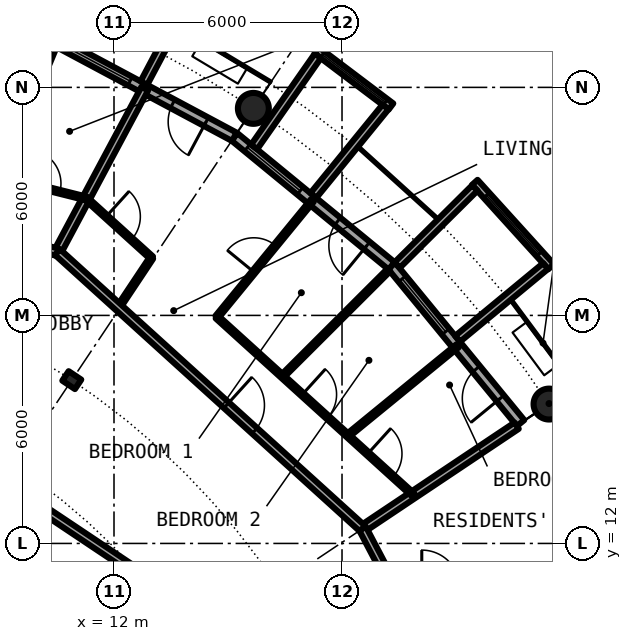
"""IFC4 building model, lengths in metres.
Left out: names, types, materials, properties, quantities, classifications, styles, units other than length and angle.
Written with IfcOpenShell. Run it as: python <this file> out.ifc"""

import sys

from ifc_helpers import new_model, si_unit, direction, frame, frame_2d, origin, origin_2d, place, context, subcontext, project, spatial, rectangle, circle, hollow_circle, i_section, extrude, element, fill, save


model = new_model("IFC4")
c1 = context("Model", 3, precision=1e-05, world=origin(), true_north=direction((0.0, 1.0)))
c2 = subcontext(c1, "Body", "Model", "MODEL_VIEW")
j1 = project(units=[si_unit("LENGTHUNIT", "METRE"), si_unit("PLANEANGLEUNIT", "RADIAN")], contexts=[c1])
p1 = place(None, origin())
s1 = spatial("IfcSite", under=j1, at=p1, CompositionType="ELEMENT")
p2 = place(p1, origin())
s2 = spatial("IfcBuilding", under=s1, at=p2, CompositionType="ELEMENT")
p3 = place(p2, frame((0.0, 0.0, 196.3)))
s3 = spatial("IfcBuildingStorey", under=s2, at=p3, CompositionType="ELEMENT", Elevation=196.3)
for number, where, z_axis, x_axis in (
    (1, (23.448, 15.667, 0.0), (0.0, 0.0, 1.0), (1.0, 0.0, 0.0)),
    (2, (15.667, 23.448, 0.0), (0.0, 0.0, 1.0), (1.0, 0.0, 0.0)),
):
    element("IfcColumn", number, at=place(p3, frame(where, z_axis=z_axis, x_axis=x_axis)), inside=s3, PredefinedType="COLUMN", context=c2, shape_type="SweptSolid", body=[
        extrude(hollow_circle(Radius=0.406, WallThickness=0.03, at=origin_2d()), origin(), (0.0, 0.0, 1.0), 3.05),
    ])
p4 = place(p3, frame((10.889, 16.297, 0.0), z_axis=(0.0, 0.0, 1.0), x_axis=(0.55557023302, 0.831469612303, 0.0)))
e3 = element("IfcColumn", 3, at=p4, inside=s3, PredefinedType="COLUMN", context=c2, shape_type="SweptSolid", body=[
    extrude(i_section(OverallWidth=0.3, OverallDepth=0.4, WebThickness=0.013, FlangeThickness=0.024, FilletRadius=0.027, at=origin_2d()), origin(), (0.0, 0.0, 1.0), 3.05),
])
p5 = place(p3, frame((22.699, 15.167, 0.0), z_axis=(0.0, 0.0, 1.0), x_axis=(-0.634382322723, 0.773019449054, 0.0)))
e4 = element("IfcWall", 4, at=p5, inside=s3, PredefinedType="SOLIDWALL", context=c2, shape_type="SweptSolid", body=[
    extrude(rectangle(XDim=5.352, YDim=0.25, at=frame_2d((2.676, 0.0))), origin(), (0.0, 0.0, 1.0), 2.7),
])
p6 = place(p5, frame((0.841, 0.0, 0.0)))
e5 = element("IfcOpeningElement", 5, at=p6, cuts=e4, PredefinedType="OPENING", context=c2, shape_type="SweptSolid", body=[
    extrude(rectangle(XDim=1.0, YDim=2.2, at=frame_2d((0.5, 1.1))), frame((0.0, 0.135, 0.0), z_axis=(0.0, -1.0, 0.0), x_axis=(1.0, 0.0, 0.0)), (0.0, 0.0, 1.0), 0.27),
])
p7 = place(p5, frame((3.111, 0.0, 0.3)))
e6 = element("IfcOpeningElement", 6, at=p7, cuts=e4, PredefinedType="OPENING", context=c2, shape_type="SweptSolid", body=[
    extrude(rectangle(XDim=1.8, YDim=2.1, at=frame_2d((0.9, 1.05))), frame((0.0, 0.135, 0.0), z_axis=(0.0, -1.0, 0.0), x_axis=(1.0, 0.0, 0.0)), (0.0, 0.0, 1.0), 0.27),
])
p8 = place(p3, frame((23.503, 19.282, -0.03), z_axis=(0.0, 0.0, 1.0), x_axis=(-0.671506829416, 0.740998365753, 0.0)))
e7 = element("IfcWall", 7, at=p8, inside=s3, PredefinedType="SOLIDWALL", context=c2, shape_type="SweptSolid", body=[
    extrude(rectangle(XDim=2.993, YDim=0.2, at=frame_2d((1.497, 0.0))), origin(), (0.0, 0.0, 1.0), 2.73),
])
p9 = place(p8, frame((0.457, 0.0, 0.33)))
e8 = element("IfcOpeningElement", 8, at=p9, cuts=e7, PredefinedType="OPENING", context=c2, shape_type="SweptSolid", body=[
    extrude(circle(Radius=1.04, at=frame_2d((1.04, 1.04))), frame((0.0, 0.11, 0.0), z_axis=(0.0, -1.0, 0.0), x_axis=(1.0, 0.0, 0.0)), (0.0, 0.0, 1.0), 0.22),
])
p10 = place(p3, frame((21.041, 17.384, -0.03), z_axis=(0.0, 0.0, 1.0), x_axis=(0.770784861449, 0.63709551667, 0.0)))
e9 = element("IfcWall", 9, at=p10, inside=s3, PredefinedType="SOLIDWALL", context=c2, shape_type="SweptSolid", body=[
    extrude(rectangle(XDim=3.006, YDim=0.2, at=frame_2d((1.503, 0.0))), origin(), (0.0, 0.0, 1.0), 2.73),
])
p11 = place(p3, frame((19.45, 19.323, -0.03), z_axis=(0.0, 0.0, 1.0), x_axis=(0.709727076896, 0.704476739375, 0.0)))
e10 = element("IfcWall", 10, at=p11, inside=s3, PredefinedType="SOLIDWALL", context=c2, shape_type="SweptSolid", body=[
    extrude(rectangle(XDim=2.883, YDim=0.2, at=frame_2d((1.441, 0.0))), origin(), (0.0, 0.0, 1.0), 2.73),
])
p12 = place(p3, frame((19.304, 19.304, 0.0), z_axis=(0.0, 0.0, 1.0), x_axis=(-0.773019449054, 0.634382322723, 0.0)))
e11 = element("IfcWall", 11, at=p12, inside=s3, PredefinedType="SOLIDWALL", context=c2, shape_type="SweptSolid", body=[
    extrude(rectangle(XDim=5.352, YDim=0.25, at=frame_2d((2.676, 0.0))), origin(), (0.0, 0.0, 1.0), 2.7),
])
p13 = place(p12, frame((0.841, 0.0, 0.0)))
e12 = element("IfcOpeningElement", 12, at=p13, cuts=e11, PredefinedType="OPENING", context=c2, shape_type="SweptSolid", body=[
    extrude(rectangle(XDim=1.0, YDim=2.2, at=frame_2d((0.5, 1.1))), frame((0.0, 0.135, 0.0), z_axis=(0.0, -1.0, 0.0), x_axis=(1.0, 0.0, 0.0)), (0.0, 0.0, 1.0), 0.27),
])
p14 = place(p12, frame((3.111, 0.0, 0.3)))
e13 = element("IfcOpeningElement", 13, at=p14, cuts=e11, PredefinedType="OPENING", context=c2, shape_type="SweptSolid", body=[
    extrude(rectangle(XDim=1.8, YDim=2.1, at=frame_2d((0.9, 1.05))), frame((0.0, 0.135, 0.0), z_axis=(0.0, -1.0, 0.0), x_axis=(1.0, 0.0, 0.0)), (0.0, 0.0, 1.0), 0.27),
])
p15 = place(p3, frame((19.289, 23.497, -0.03), z_axis=(0.0, 0.0, 1.0), x_axis=(-0.797887588059, 0.602806268067, 0.0)))
e14 = element("IfcWall", 14, at=p15, inside=s3, PredefinedType="SOLIDWALL", context=c2, shape_type="SweptSolid", body=[
    extrude(rectangle(XDim=2.447, YDim=0.2, at=frame_2d((1.223, 0.0))), origin(), (0.0, 0.0, 1.0), 2.73),
])
p16 = place(p15, frame((0.183, 0.0, 0.33)))
e15 = element("IfcOpeningElement", 15, at=p16, cuts=e14, PredefinedType="OPENING", context=c2, shape_type="SweptSolid", body=[
    extrude(circle(Radius=1.04, at=frame_2d((1.04, 1.04))), frame((0.0, 0.11, 0.0), z_axis=(0.0, -1.0, 0.0), x_axis=(1.0, 0.0, 0.0)), (0.0, 0.0, 1.0), 0.22),
])
p17 = place(p3, frame((17.246, 21.155, -0.03), z_axis=(0.0, 0.0, 1.0), x_axis=(0.631741648902, 0.775179004516, 0.0)))
e16 = element("IfcWall", 16, at=p17, inside=s3, PredefinedType="SOLIDWALL", context=c2, shape_type="SweptSolid", body=[
    extrude(rectangle(XDim=3.006, YDim=0.2, at=frame_2d((1.503, 0.0))), origin(), (0.0, 0.0, 1.0), 2.73),
])
p18 = place(p3, frame((15.688, 22.433, -0.03), z_axis=(0.0, 0.0, 1.0), x_axis=(0.573260687834, 0.819373043115, 0.0)))
e17 = element("IfcWall", 17, at=p18, inside=s3, PredefinedType="SOLIDWALL", context=c2, shape_type="SweptSolid", body=[
    extrude(rectangle(XDim=2.925, YDim=0.2, at=frame_2d((1.463, 0.0))), origin(), (0.0, 0.0, 1.0), 2.73),
])
p19 = place(p3, frame((15.167, 22.699, 0.0), z_axis=(0.0, 0.0, 1.0), x_axis=(-0.881915646801, 0.471407246368, 0.0)))
e18 = element("IfcWall", 18, at=p19, inside=s3, PredefinedType="SOLIDWALL", context=c2, shape_type="SweptSolid", body=[
    extrude(rectangle(XDim=5.352, YDim=0.25, at=frame_2d((2.676, 0.0))), origin(), (0.0, 0.0, 1.0), 2.7),
])
p20 = place(p19, frame((0.841, 0.0, 0.0)))
e19 = element("IfcOpeningElement", 19, at=p20, cuts=e18, PredefinedType="OPENING", context=c2, shape_type="SweptSolid", body=[
    extrude(rectangle(XDim=1.0, YDim=2.2, at=frame_2d((0.5, 1.1))), frame((0.0, 0.135, 0.0), z_axis=(0.0, -1.0, 0.0), x_axis=(1.0, 0.0, 0.0)), (0.0, 0.0, 1.0), 0.27),
])
p21 = place(p19, frame((3.111, 0.0, 0.3)))
e20 = element("IfcOpeningElement", 20, at=p21, cuts=e18, PredefinedType="OPENING", context=c2, shape_type="SweptSolid", body=[
    extrude(rectangle(XDim=1.8, YDim=2.1, at=frame_2d((0.9, 1.05))), frame((0.0, 0.135, 0.0), z_axis=(0.0, -1.0, 0.0), x_axis=(1.0, 0.0, 0.0)), (0.0, 0.0, 1.0), 0.27),
])
p22 = place(p3, frame((12.787, 24.113, -0.03), z_axis=(0.0, 0.0, 1.0), x_axis=(0.468365282436, 0.883534924159, 0.0)))
e21 = element("IfcWall", 21, at=p22, inside=s3, PredefinedType="SOLIDWALL", context=c2, shape_type="SweptSolid", body=[
    extrude(rectangle(XDim=3.006, YDim=0.2, at=frame_2d((1.503, 0.0))), origin(), (0.0, 0.0, 1.0), 2.73),
])
p23 = place(p3, frame((9.013, 21.642, 0.0), z_axis=(0.0, 0.0, 1.0), x_axis=(0.384420204655, 0.923158223845, 0.0)))
e22 = element("IfcWall", 22, at=p23, inside=s3, PredefinedType="PARTITIONING", context=c2, shape_type="SweptSolid", body=[
    extrude(rectangle(XDim=3.73, YDim=0.1, at=frame_2d((1.865, 0.0))), origin(), (0.0, 0.0, 1.0), 2.7),
])
p24 = place(p3, frame((10.512, 19.667, 0.0), z_axis=(0.0, 0.0, 1.0), x_axis=(0.471271812246, 0.881988026553, 0.0)))
e23 = element("IfcWall", 23, at=p24, inside=s3, PredefinedType="PARTITIONING", context=c2, shape_type="SweptSolid", body=[
    extrude(rectangle(XDim=4.874, YDim=0.2, at=frame_2d((2.437, 0.0))), origin(), (0.0, 0.0, 1.0), 2.7),
])
p25 = place(p3, frame((12.118, 18.211, 0.0), z_axis=(0.0, 0.0, 1.0), x_axis=(0.554125989098, 0.832432813028, 0.0)))
e24 = element("IfcWall", 24, at=p25, inside=s3, PredefinedType="PARTITIONING", context=c2, shape_type="SweptSolid", body=[
    extrude(rectangle(XDim=1.57, YDim=0.1, at=frame_2d((0.785, 0.0))), origin(), (0.0, 0.0, 1.0), 2.7),
])
p26 = place(p3, frame((14.709, 17.958, 0.0), z_axis=(0.0, 0.0, 1.0), x_axis=(0.633590098448, 0.773668913133, 0.0)))
e25 = element("IfcWall", 25, at=p26, inside=s3, PredefinedType="PARTITIONING", context=c2, shape_type="SweptSolid", body=[
    extrude(rectangle(XDim=3.962, YDim=0.1, at=frame_2d((1.981, 0.0))), origin(), (0.0, 0.0, 1.0), 2.7),
])
p27 = place(p26, frame((1.531, 0.0, 0.0)))
e26 = element("IfcOpeningElement", 26, at=p27, cuts=e25, PredefinedType="OPENING", context=c2, shape_type="SweptSolid", body=[
    extrude(rectangle(XDim=0.9, YDim=2.3, at=frame_2d((0.45, 1.15))), frame((0.0, 0.06, 0.0), z_axis=(0.0, -1.0, 0.0), x_axis=(1.0, 0.0, 0.0)), (0.0, 0.0, 1.0), 0.12),
])
p28 = place(p3, frame((16.43, 16.398, 0.0), z_axis=(0.0, 0.0, 1.0), x_axis=(0.707722727509, 0.706490297858, 0.0)))
e27 = element("IfcWall", 27, at=p28, inside=s3, PredefinedType="PARTITIONING", context=c2, shape_type="SweptSolid", body=[
    extrude(rectangle(XDim=3.962, YDim=0.1, at=frame_2d((1.981, 0.0))), origin(), (0.0, 0.0, 1.0), 2.7),
])
p29 = place(p3, frame((18.151, 14.838, 0.0), z_axis=(0.0, 0.0, 1.0), x_axis=(0.774321581607, 0.63279229472, 0.0)))
e28 = element("IfcWall", 28, at=p29, inside=s3, PredefinedType="PARTITIONING", context=c2, shape_type="SweptSolid", body=[
    extrude(rectangle(XDim=3.731, YDim=0.1, at=frame_2d((1.866, 0.0))), origin(), (0.0, 0.0, 1.0), 2.7),
])
p30 = place(p3, frame((18.542, 12.389, 0.0), z_axis=(0.0, 0.0, 1.0), x_axis=(0.831387096605, 0.55569370664, 0.0)))
e29 = element("IfcWall", 29, at=p30, inside=s3, PredefinedType="PARTITIONING", context=c2, shape_type="SweptSolid", body=[
    extrude(rectangle(XDim=4.875, YDim=0.2, at=frame_2d((2.438, 0.0))), origin(), (0.0, 0.0, 1.0), 2.7),
])
p31 = place(p3, frame((3.453, 17.36, 0.0), z_axis=(0.0, 0.0, 1.0), x_axis=(0.831437137577, -0.555618831806, 0.0)))
e30 = element("IfcWall", 30, at=p31, inside=s3, PredefinedType="PARTITIONING", context=c2, shape_type="SweptSolid", body=[
    extrude(rectangle(XDim=13.549, YDim=0.2, at=frame_2d((6.774, 0.0))), origin(), (0.0, 0.0, 1.0), 2.7),
])
p32 = place(p31, frame((4.581, 0.0, 0.0)))
e31 = element("IfcOpeningElement", 31, at=p32, cuts=e30, PredefinedType="OPENING", context=c2, shape_type="SweptSolid", body=[
    extrude(rectangle(XDim=1.0, YDim=2.3, at=frame_2d((0.5, 1.15))), frame((0.0, 0.11, 0.0), z_axis=(0.0, -1.0, 0.0), x_axis=(1.0, 0.0, 0.0)), (0.0, 0.0, 1.0), 0.22),
])
p33 = place(p3, frame((0.0, 22.3, 0.0), z_axis=(0.0, 0.0, 1.0), x_axis=(0.969975381822, -0.243203122222, 0.0)))
e32 = element("IfcWall", 32, at=p33, inside=s3, PredefinedType="PARTITIONING", context=c2, shape_type="SweptSolid", body=[
    extrude(rectangle(XDim=10.843, YDim=0.2, at=frame_2d((5.421, 0.0))), origin(), (0.0, 0.0, 1.0), 2.7),
])
p34 = place(p33, frame((6.002, 0.0, 0.0)))
e33 = element("IfcOpeningElement", 33, at=p34, cuts=e32, PredefinedType="OPENING", context=c2, shape_type="SweptSolid", body=[
    extrude(rectangle(XDim=1.0, YDim=2.3, at=frame_2d((0.5, 1.15))), frame((0.0, 0.11, 0.0), z_axis=(0.0, -1.0, 0.0), x_axis=(1.0, 0.0, 0.0)), (0.0, 0.0, 1.0), 0.22),
])
p35 = place(p3, frame((10.512, 19.667, 0.0), z_axis=(0.0, 0.0, 1.0), x_axis=(0.740849323054, -0.67167125927, 0.0)))
e34 = element("IfcWall", 34, at=p35, inside=s3, PredefinedType="PARTITIONING", context=c2, shape_type="SweptSolid", body=[
    extrude(rectangle(XDim=10.842, YDim=0.2, at=frame_2d((5.421, 0.0))), origin(), (0.0, 0.0, 1.0), 2.7),
])
p36 = place(p35, frame((6.003, 0.0, 0.0)))
e35 = element("IfcOpeningElement", 35, at=p36, cuts=e34, PredefinedType="OPENING", context=c2, shape_type="SweptSolid", body=[
    extrude(rectangle(XDim=1.0, YDim=2.3, at=frame_2d((0.5, 1.15))), frame((0.0, 0.11, 0.0), z_axis=(0.0, -1.0, 0.0), x_axis=(1.0, 0.0, 0.0)), (0.0, 0.0, 1.0), 0.22),
])
p37 = place(p3, frame((18.542, 12.389, 0.0), z_axis=(0.0, 0.0, 1.0), x_axis=(0.465359652486, -0.885121683068, 0.0)))
e36 = element("IfcWall", 36, at=p37, inside=s3, PredefinedType="PARTITIONING", context=c2, shape_type="SweptSolid", body=[
    extrude(rectangle(XDim=1.665, YDim=0.2, at=frame_2d((0.833, 0.0))), origin(), (0.0, 0.0, 1.0), 2.7),
])
p38 = place(p3, frame((4.507, 22.771, 0.0), z_axis=(0.0, 0.0, 1.0), x_axis=(0.970020829306, -0.243021790611, 0.0)))
e37 = element("IfcWall", 37, at=p38, inside=s3, PredefinedType="PARTITIONING", context=c2, shape_type="SweptSolid", body=[
    extrude(rectangle(XDim=6.971, YDim=0.1, at=frame_2d((3.485, 0.0))), origin(), (0.0, 0.0, 1.0), 2.7),
])
p39 = place(p38, frame((3.031, 0.0, 0.0)))
e38 = element("IfcOpeningElement", 38, at=p39, cuts=e37, PredefinedType="OPENING", context=c2, shape_type="SweptSolid", body=[
    extrude(rectangle(XDim=0.9, YDim=2.3, at=frame_2d((0.45, 1.15))), frame((0.0, 0.06, 0.0), z_axis=(0.0, -1.0, 0.0), x_axis=(1.0, 0.0, 0.0)), (0.0, 0.0, 1.0), 0.12),
])
p40 = place(p38, frame((5.358, 0.0, 0.0)))
e39 = element("IfcOpeningElement", 39, at=p40, cuts=e37, PredefinedType="OPENING", context=c2, shape_type="SweptSolid", body=[
    extrude(rectangle(XDim=0.9, YDim=2.3, at=frame_2d((0.45, 1.15))), frame((0.0, 0.06, 0.0), z_axis=(0.0, -1.0, 0.0), x_axis=(1.0, 0.0, 0.0)), (0.0, 0.0, 1.0), 0.12),
])
p41 = place(p3, frame((11.271, 21.074, 0.0), z_axis=(0.0, 0.0, 1.0), x_axis=(0.74087097024, -0.671647381783, 0.0)))
e40 = element("IfcWall", 40, at=p41, inside=s3, PredefinedType="PARTITIONING", context=c2, shape_type="SweptSolid", body=[
    extrude(rectangle(XDim=2.324, YDim=0.1, at=frame_2d((1.162, 0.0))), origin(), (0.0, 0.0, 1.0), 2.7),
])
p42 = place(p41, frame((0.705, 0.0, 0.0)))
e41 = element("IfcOpeningElement", 41, at=p42, cuts=e40, PredefinedType="OPENING", context=c2, shape_type="SweptSolid", body=[
    extrude(rectangle(XDim=0.9, YDim=2.3, at=frame_2d((0.45, 1.15))), frame((0.0, 0.06, 0.0), z_axis=(0.0, -1.0, 0.0), x_axis=(1.0, 0.0, 0.0)), (0.0, 0.0, 1.0), 0.12),
])
p43 = place(p3, frame((14.709, 17.958, 0.0), z_axis=(0.0, 0.0, 1.0), x_axis=(0.740923753351, -0.671589153962, 0.0)))
e42 = element("IfcWall", 42, at=p43, inside=s3, PredefinedType="PARTITIONING", context=c2, shape_type="SweptSolid", body=[
    extrude(rectangle(XDim=6.969, YDim=0.1, at=frame_2d((3.484, 0.0))), origin(), (0.0, 0.0, 1.0), 2.7),
])
p44 = place(p43, frame((3.034, 0.0, 0.0)))
e43 = element("IfcOpeningElement", 43, at=p44, cuts=e42, PredefinedType="OPENING", context=c2, shape_type="SweptSolid", body=[
    extrude(rectangle(XDim=0.9, YDim=2.3, at=frame_2d((0.45, 1.15))), frame((0.0, 0.06, 0.0), z_axis=(0.0, -1.0, 0.0), x_axis=(1.0, 0.0, 0.0)), (0.0, 0.0, 1.0), 0.12),
])
p45 = place(p43, frame((5.357, 0.0, 0.0)))
e44 = element("IfcOpeningElement", 44, at=p45, cuts=e42, PredefinedType="OPENING", context=c2, shape_type="SweptSolid", body=[
    extrude(rectangle(XDim=0.9, YDim=2.3, at=frame_2d((0.45, 1.15))), frame((0.0, 0.06, 0.0), z_axis=(0.0, -1.0, 0.0), x_axis=(1.0, 0.0, 0.0)), (0.0, 0.0, 1.0), 0.12),
])
p46 = place(p6, origin())
e45 = element("IfcDoor", 45, at=p46, inside=s3, OperationType="SINGLE_SWING_LEFT", PredefinedType="DOOR", context=c2, shape_type="SweptSolid", body=[
    extrude(rectangle(XDim=1.0, YDim=2.2, at=frame_2d((0.5, 1.1))), frame((0.0, 0.025, 0.0), z_axis=(0.0, -1.0, 0.0), x_axis=(1.0, 0.0, 0.0)), (0.0, 0.0, 1.0), 0.05),
])
fill(e5, e45)
p47 = place(p7, origin())
e46 = element("IfcWindow", 46, at=p47, inside=s3, PartitioningType="SINGLE_PANEL", PredefinedType="WINDOW", context=c2, shape_type="SweptSolid", body=[
    extrude(rectangle(XDim=1.8, YDim=2.1, at=frame_2d((0.9, 1.05))), frame((0.0, 0.03, 0.0), z_axis=(0.0, -1.0, 0.0), x_axis=(1.0, 0.0, 0.0)), (0.0, 0.0, 1.0), 0.06),
])
fill(e6, e46)
p48 = place(p9, origin())
e47 = element("IfcWindow", 47, at=p48, inside=s3, PartitioningType="SINGLE_PANEL", PredefinedType="WINDOW", context=c2, shape_type="SweptSolid", body=[
    extrude(circle(Radius=1.04, at=frame_2d((1.04, 1.04))), frame((0.0, 0.03, 0.0), z_axis=(0.0, -1.0, 0.0), x_axis=(1.0, 0.0, 0.0)), (0.0, 0.0, 1.0), 0.06),
])
fill(e8, e47)
p49 = place(p13, origin())
e48 = element("IfcDoor", 48, at=p49, inside=s3, OperationType="SINGLE_SWING_LEFT", PredefinedType="DOOR", context=c2, shape_type="SweptSolid", body=[
    extrude(rectangle(XDim=1.0, YDim=2.2, at=frame_2d((0.5, 1.1))), frame((0.0, 0.025, 0.0), z_axis=(0.0, -1.0, 0.0), x_axis=(1.0, 0.0, 0.0)), (0.0, 0.0, 1.0), 0.05),
])
fill(e12, e48)
p50 = place(p14, origin())
e49 = element("IfcWindow", 49, at=p50, inside=s3, PartitioningType="SINGLE_PANEL", PredefinedType="WINDOW", context=c2, shape_type="SweptSolid", body=[
    extrude(rectangle(XDim=1.8, YDim=2.1, at=frame_2d((0.9, 1.05))), frame((0.0, 0.03, 0.0), z_axis=(0.0, -1.0, 0.0), x_axis=(1.0, 0.0, 0.0)), (0.0, 0.0, 1.0), 0.06),
])
fill(e13, e49)
p51 = place(p16, origin())
e50 = element("IfcWindow", 50, at=p51, inside=s3, PartitioningType="SINGLE_PANEL", PredefinedType="WINDOW", context=c2, shape_type="SweptSolid", body=[
    extrude(circle(Radius=1.04, at=frame_2d((1.04, 1.04))), frame((0.0, 0.03, 0.0), z_axis=(0.0, -1.0, 0.0), x_axis=(1.0, 0.0, 0.0)), (0.0, 0.0, 1.0), 0.06),
])
fill(e15, e50)
p52 = place(p20, origin())
e51 = element("IfcDoor", 51, at=p52, inside=s3, OperationType="SINGLE_SWING_LEFT", PredefinedType="DOOR", context=c2, shape_type="SweptSolid", body=[
    extrude(rectangle(XDim=1.0, YDim=2.2, at=frame_2d((0.5, 1.1))), frame((0.0, 0.025, 0.0), z_axis=(0.0, -1.0, 0.0), x_axis=(1.0, 0.0, 0.0)), (0.0, 0.0, 1.0), 0.05),
])
fill(e19, e51)
p53 = place(p21, origin())
e52 = element("IfcWindow", 52, at=p53, inside=s3, PartitioningType="SINGLE_PANEL", PredefinedType="WINDOW", context=c2, shape_type="SweptSolid", body=[
    extrude(rectangle(XDim=1.8, YDim=2.1, at=frame_2d((0.9, 1.05))), frame((0.0, 0.03, 0.0), z_axis=(0.0, -1.0, 0.0), x_axis=(1.0, 0.0, 0.0)), (0.0, 0.0, 1.0), 0.06),
])
fill(e20, e52)
p54 = place(p36, origin())
e53 = element("IfcDoor", 53, at=p54, inside=s3, OperationType="SINGLE_SWING_RIGHT", PredefinedType="DOOR", context=c2, shape_type="SweptSolid", body=[
    extrude(rectangle(XDim=1.0, YDim=2.3, at=frame_2d((0.5, 1.15))), frame((0.0, 0.025, 0.0), z_axis=(0.0, -1.0, 0.0), x_axis=(1.0, 0.0, 0.0)), (0.0, 0.0, 1.0), 0.05),
])
fill(e35, e53)
p55 = place(p42, origin())
e54 = element("IfcDoor", 54, at=p55, inside=s3, OperationType="SINGLE_SWING_LEFT", PredefinedType="DOOR", context=c2, shape_type="SweptSolid", body=[
    extrude(rectangle(XDim=0.9, YDim=2.3, at=frame_2d((0.45, 1.15))), frame((0.0, 0.025, 0.0), z_axis=(0.0, -1.0, 0.0), x_axis=(1.0, 0.0, 0.0)), (0.0, 0.0, 1.0), 0.05),
])
fill(e41, e54)
p56 = place(p27, origin())
e55 = element("IfcDoor", 55, at=p56, inside=s3, OperationType="SINGLE_SWING_RIGHT", PredefinedType="DOOR", context=c2, shape_type="SweptSolid", body=[
    extrude(rectangle(XDim=0.9, YDim=2.3, at=frame_2d((0.45, 1.15))), frame((0.0, 0.025, 0.0), z_axis=(0.0, -1.0, 0.0), x_axis=(1.0, 0.0, 0.0)), (0.0, 0.0, 1.0), 0.05),
])
fill(e26, e55)
p57 = place(p44, origin())
e56 = element("IfcDoor", 56, at=p57, inside=s3, OperationType="SINGLE_SWING_LEFT", PredefinedType="DOOR", context=c2, shape_type="SweptSolid", body=[
    extrude(rectangle(XDim=0.9, YDim=2.3, at=frame_2d((0.45, 1.15))), frame((0.0, 0.025, 0.0), z_axis=(0.0, -1.0, 0.0), x_axis=(1.0, 0.0, 0.0)), (0.0, 0.0, 1.0), 0.05),
])
fill(e43, e56)
p58 = place(p45, origin())
e57 = element("IfcDoor", 57, at=p58, inside=s3, OperationType="SINGLE_SWING_RIGHT", PredefinedType="DOOR", context=c2, shape_type="SweptSolid", body=[
    extrude(rectangle(XDim=0.9, YDim=2.3, at=frame_2d((0.45, 1.15))), frame((0.0, 0.025, 0.0), z_axis=(0.0, -1.0, 0.0), x_axis=(1.0, 0.0, 0.0)), (0.0, 0.0, 1.0), 0.05),
])
fill(e44, e57)
p59 = place(p40, origin())
e58 = element("IfcDoor", 58, at=p59, inside=s3, OperationType="SINGLE_SWING_RIGHT", PredefinedType="DOOR", context=c2, shape_type="SweptSolid", body=[
    extrude(rectangle(XDim=0.9, YDim=2.3, at=frame_2d((0.45, 1.15))), frame((0.0, 0.025, 0.0), z_axis=(0.0, -1.0, 0.0), x_axis=(1.0, 0.0, 0.0)), (0.0, 0.0, 1.0), 0.05),
])
fill(e39, e58)
save(model, sys.argv[1])
